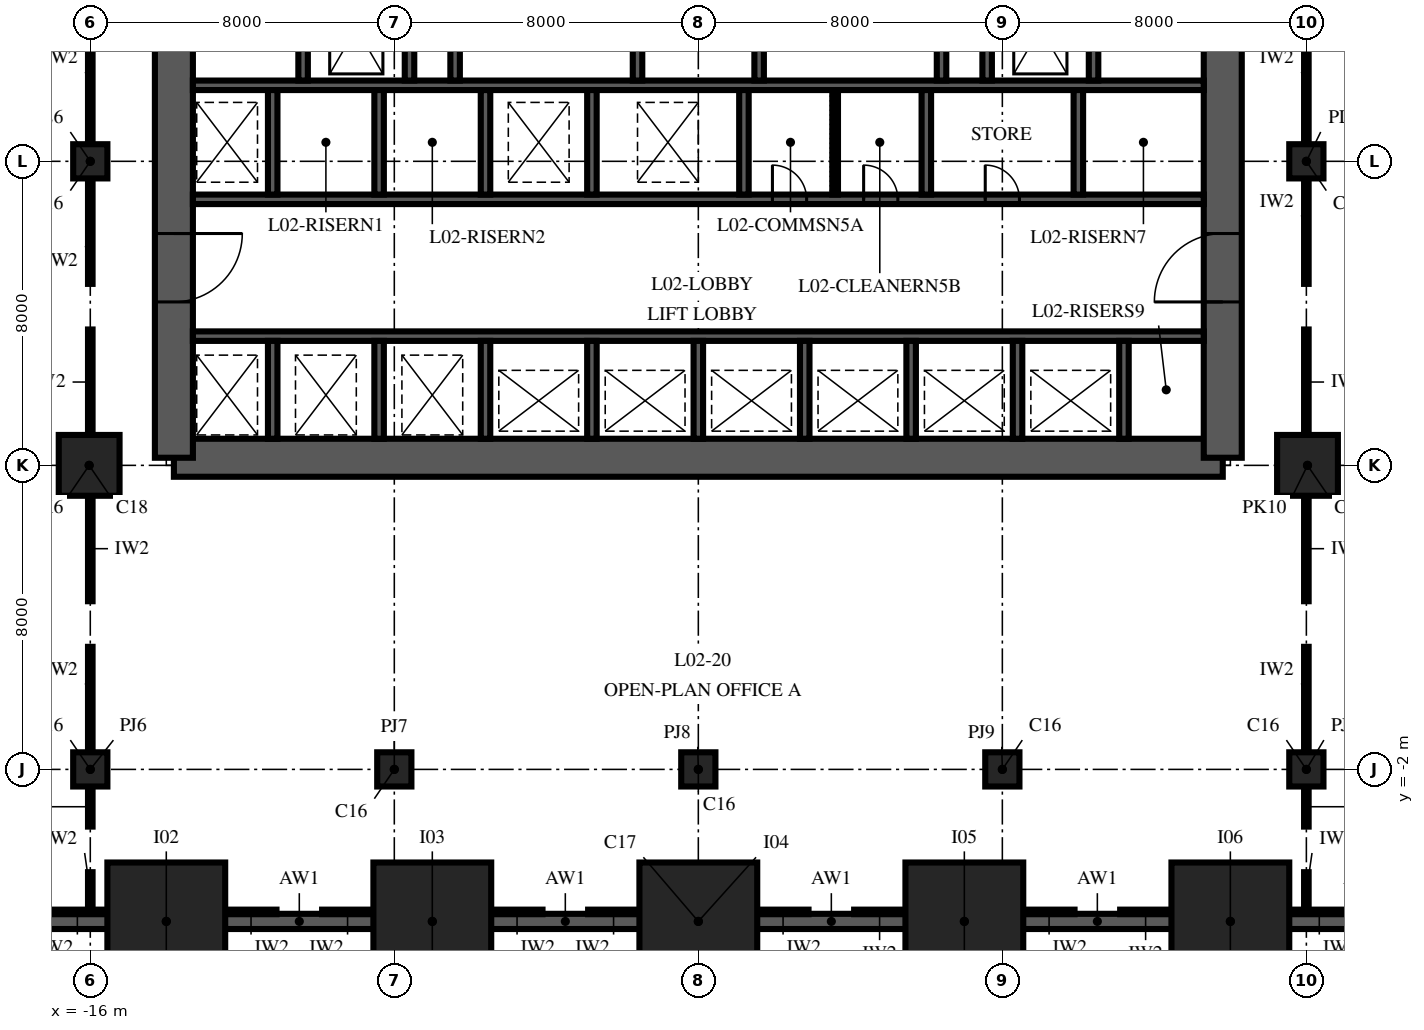
"""IFC4 building model, lengths in metres.
Left out: names, types, materials, properties, quantities, classifications, styles, units other than length and angle.
Written with IfcOpenShell. Run it as: python <this file> out.ifc"""

import sys

from ifc_helpers import new_model, si_unit, direction, frame, frame_2d, origin, origin_2d, place, context, subcontext, project, spatial, polyline, rectangle, outline, extrude, element, fill, save


model = new_model("IFC4")
c1 = context("Model", 3, precision=1e-05, world=origin(), true_north=direction((0.0, 1.0)))
c2 = subcontext(c1, "Body", "Model", "MODEL_VIEW")
j1 = project(units=[si_unit("LENGTHUNIT", "METRE"), si_unit("PLANEANGLEUNIT", "RADIAN")], contexts=[c1])
p1 = place(None, origin())
s1 = spatial("IfcSite", under=j1, at=p1, CompositionType="ELEMENT")
p2 = place(p1, origin())
s2 = spatial("IfcBuilding", under=s1, at=p2, CompositionType="ELEMENT")
p3 = place(p2, frame((0.0, 0.0, 12.0)))
s3 = spatial("IfcBuildingStorey", under=s2, at=p3, CompositionType="ELEMENT", Elevation=12.0)
for number, where, z_axis, x_axis in (
    (1, (-14.0, -6.0, 0.0), (0.0, 0.0, 1.0), (1.0, 0.0, 0.0)),
    (2, (-7.0, -6.0, 0.0), (0.0, 0.0, 1.0), (1.0, 0.0, 0.0)),
    (3, (0.0, -6.0, 0.0), (0.0, 0.0, 1.0), (1.0, 0.0, 0.0)),
    (4, (7.0, -6.0, 0.0), (0.0, 0.0, 1.0), (1.0, 0.0, 0.0)),
    (5, (14.0, -6.0, 0.0), (0.0, 0.0, 1.0), (1.0, 0.0, 0.0)),
):
    element("IfcColumn", number, at=place(p3, frame(where, z_axis=z_axis, x_axis=x_axis)), inside=s3, PredefinedType="COLUMN", context=c2, shape_type="SweptSolid", body=[
        extrude(rectangle(XDim=3.1, YDim=3.1, at=origin_2d()), origin(), (0.0, 0.0, 1.0), 7.0),
    ])
p4 = place(p3, frame((-16.0, -2.0, 0.0), z_axis=(0.0, 0.0, 1.0), x_axis=(1.0, 0.0, 0.0)))
e6 = element("IfcColumn", 6, at=p4, inside=s3, PredefinedType="COLUMN", context=c2, shape_type="SweptSolid", body=[
    extrude(rectangle(XDim=0.9, YDim=0.9, at=origin_2d()), origin(), (0.0, 0.0, 1.0), 7.0),
])
p5 = place(p3, frame((-16.03, 6.0, 0.0), z_axis=(0.0, 0.0, 1.0), x_axis=(1.0, 0.0, 0.0)))
e7 = element("IfcColumn", 7, at=p5, inside=s3, PredefinedType="COLUMN", context=c2, shape_type="SweptSolid", body=[
    extrude(rectangle(XDim=1.6, YDim=1.6, at=origin_2d()), origin(), (0.0, 0.0, 1.0), 7.0),
])
for number, where, z_axis, x_axis in (
    (8, (-16.0, 14.0, 0.0), (0.0, 0.0, 1.0), (1.0, 0.0, 0.0)),
    (9, (-8.0, -2.0, 0.0), (0.0, 0.0, 1.0), (1.0, 0.0, 0.0)),
    (10, (0.0, -2.0, 0.0), (0.0, 0.0, 1.0), (1.0, 0.0, 0.0)),
    (11, (8.0, -2.0, 0.0), (0.0, 0.0, 1.0), (1.0, 0.0, 0.0)),
    (12, (16.0, -2.0, 0.0), (0.0, 0.0, 1.0), (1.0, 0.0, 0.0)),
):
    element("IfcColumn", number, at=place(p3, frame(where, z_axis=z_axis, x_axis=x_axis)), inside=s3, PredefinedType="COLUMN", context=c2, shape_type="SweptSolid", body=[
        extrude(rectangle(XDim=0.9, YDim=0.9, at=origin_2d()), origin(), (0.0, 0.0, 1.0), 7.0),
    ])
p6 = place(p3, frame((16.03, 6.0, 0.0), z_axis=(0.0, 0.0, 1.0), x_axis=(1.0, 0.0, 0.0)))
e13 = element("IfcColumn", 13, at=p6, inside=s3, PredefinedType="COLUMN", context=c2, shape_type="SweptSolid", body=[
    extrude(rectangle(XDim=1.6, YDim=1.6, at=origin_2d()), origin(), (0.0, 0.0, 1.0), 7.0),
])
p7 = place(p3, frame((16.0, 14.0, 0.0), z_axis=(0.0, 0.0, 1.0), x_axis=(1.0, 0.0, 0.0)))
e14 = element("IfcColumn", 14, at=p7, inside=s3, PredefinedType="COLUMN", context=c2, shape_type="SweptSolid", body=[
    extrude(rectangle(XDim=0.9, YDim=0.9, at=origin_2d()), origin(), (0.0, 0.0, 1.0), 7.0),
])
p8 = place(p3, frame((-13.8, 6.2, 0.0), z_axis=(0.0, 0.0, 1.0), x_axis=(1.0, 0.0, 0.0)))
e15 = element("IfcWall", 15, at=p8, inside=s3, PredefinedType="SHEAR", context=c2, shape_type="SweptSolid", body=[
    extrude(rectangle(XDim=27.6, YDim=1.0, at=frame_2d((13.8, 0.0))), origin(), (0.0, 0.0, 1.0), 7.0),
])
p9 = place(p3, frame((13.8, 6.2, 0.0), z_axis=(0.0, 0.0, 1.0), x_axis=(0.0, 1.0, 0.0)))
e16 = element("IfcWall", 16, at=p9, inside=s3, PredefinedType="SHEAR", context=c2, shape_type="SweptSolid", body=[
    extrude(outline(polyline([(0.0, -0.5), (17.6, -0.5), (17.6, 0.0), (17.1, 0.0), (17.1, 0.5), (0.5, 0.5), (0.5, 0.0), (0.0, 0.0), (0.0, -0.5)])), origin(), (0.0, 0.0, 1.0), 7.0),
])
p10 = place(p9, frame((4.1, 0.0, 0.0)))
e17 = element("IfcOpeningElement", 17, at=p10, cuts=e16, PredefinedType="OPENING", context=c2, shape_type="SweptSolid", body=[
    extrude(rectangle(XDim=1.8, YDim=2.4, at=frame_2d((0.9, 1.2))), frame((0.0, 0.515, 0.0), z_axis=(0.0, -1.0, 0.0), x_axis=(1.0, 0.0, 0.0)), (0.0, 0.0, 1.0), 1.03),
])
p11 = place(p3, frame((-13.8, 23.8, 0.0), z_axis=(0.0, 0.0, 1.0), x_axis=(0.0, -1.0, 0.0)))
e18 = element("IfcWall", 18, at=p11, inside=s3, PredefinedType="SHEAR", context=c2, shape_type="SweptSolid", body=[
    extrude(outline(polyline([(0.0, -0.5), (17.6, -0.5), (17.6, 0.0), (17.1, 0.0), (17.1, 0.5), (0.5, 0.5), (0.5, 0.0), (0.0, 0.0), (0.0, -0.5)])), origin(), (0.0, 0.0, 1.0), 7.0),
])
p12 = place(p11, frame((11.7, 0.0, 0.0)))
e19 = element("IfcOpeningElement", 19, at=p12, cuts=e18, PredefinedType="OPENING", context=c2, shape_type="SweptSolid", body=[
    extrude(rectangle(XDim=1.8, YDim=2.4, at=frame_2d((0.9, 1.2))), frame((0.0, 0.515, 0.0), z_axis=(0.0, -1.0, 0.0), x_axis=(1.0, 0.0, 0.0)), (0.0, 0.0, 1.0), 1.03),
])
p13 = place(p3, frame((-13.3, 9.4, 0.0), z_axis=(0.0, 0.0, 1.0), x_axis=(1.0, 0.0, 0.0)))
e20 = element("IfcWall", 20, at=p13, inside=s3, PredefinedType="SHEAR", context=c2, shape_type="SweptSolid", body=[
    extrude(rectangle(XDim=26.6, YDim=0.25, at=frame_2d((13.3, 0.0))), origin(), (0.0, 0.0, 1.0), 7.0),
])
p14 = place(p3, frame((-13.3, 13.0, 0.0), z_axis=(0.0, 0.0, 1.0), x_axis=(1.0, 0.0, 0.0)))
e21 = element("IfcWall", 21, at=p14, inside=s3, PredefinedType="SHEAR", context=c2, shape_type="SweptSolid", body=[
    extrude(rectangle(XDim=26.6, YDim=0.25, at=frame_2d((13.3, 0.0))), origin(), (0.0, 0.0, 1.0), 7.0),
])
p15 = place(p14, frame((15.25, 0.0, 0.0)))
e22 = element("IfcOpeningElement", 22, at=p15, cuts=e21, PredefinedType="OPENING", context=c2, shape_type="SweptSolid", body=[
    extrude(rectangle(XDim=0.9, YDim=2.1, at=frame_2d((0.45, 1.05))), frame((0.0, 0.14, 0.0), z_axis=(0.0, -1.0, 0.0), x_axis=(1.0, 0.0, 0.0)), (0.0, 0.0, 1.0), 0.28),
])
p16 = place(p14, frame((17.65, 0.0, 0.0)))
e23 = element("IfcOpeningElement", 23, at=p16, cuts=e21, PredefinedType="OPENING", context=c2, shape_type="SweptSolid", body=[
    extrude(rectangle(XDim=0.9, YDim=2.1, at=frame_2d((0.45, 1.05))), frame((0.0, 0.14, 0.0), z_axis=(0.0, -1.0, 0.0), x_axis=(1.0, 0.0, 0.0)), (0.0, 0.0, 1.0), 0.28),
])
p17 = place(p14, frame((20.85, 0.0, 0.0)))
e24 = element("IfcOpeningElement", 24, at=p17, cuts=e21, PredefinedType="OPENING", context=c2, shape_type="SweptSolid", body=[
    extrude(rectangle(XDim=0.9, YDim=2.1, at=frame_2d((0.45, 1.05))), frame((0.0, 0.14, 0.0), z_axis=(0.0, -1.0, 0.0), x_axis=(1.0, 0.0, 0.0)), (0.0, 0.0, 1.0), 0.28),
])
p18 = place(p3, frame((-13.3, 16.0, 0.0), z_axis=(0.0, 0.0, 1.0), x_axis=(1.0, 0.0, 0.0)))
e25 = element("IfcWall", 25, at=p18, inside=s3, PredefinedType="SHEAR", context=c2, shape_type="SweptSolid", body=[
    extrude(rectangle(XDim=26.6, YDim=0.25, at=frame_2d((13.3, 0.0))), origin(), (0.0, 0.0, 1.0), 7.0),
])
for number, where, z_axis, x_axis in (
    (26, (-11.2, 6.7, 0.0), (0.0, 0.0, 1.0), (0.0, 1.0, 0.0)),
    (27, (-8.4, 6.7, 0.0), (0.0, 0.0, 1.0), (0.0, 1.0, 0.0)),
    (28, (-5.6, 6.7, 0.0), (0.0, 0.0, 1.0), (0.0, 1.0, 0.0)),
    (29, (-2.8, 6.7, 0.0), (0.0, 0.0, 1.0), (0.0, 1.0, 0.0)),
    (30, (0.0, 6.7, 0.0), (0.0, 0.0, 1.0), (0.0, 1.0, 0.0)),
    (31, (2.8, 6.7, 0.0), (0.0, 0.0, 1.0), (0.0, 1.0, 0.0)),
    (32, (5.6, 6.7, 0.0), (0.0, 0.0, 1.0), (0.0, 1.0, 0.0)),
    (33, (8.4, 6.7, 0.0), (0.0, 0.0, 1.0), (0.0, 1.0, 0.0)),
    (34, (11.2, 6.7, 0.0), (0.0, 0.0, 1.0), (0.0, 1.0, 0.0)),
):
    element("IfcWall", number, at=place(p3, frame(where, z_axis=z_axis, x_axis=x_axis)), inside=s3, PredefinedType="SHEAR", context=c2, shape_type="SweptSolid", body=[
        extrude(rectangle(XDim=2.575, YDim=0.25, at=frame_2d((1.288, 0.0))), origin(), (0.0, 0.0, 1.0), 7.0),
    ])
for number, where, z_axis, x_axis in (
    (35, (-11.2, 13.125, 0.0), (0.0, 0.0, 1.0), (0.0, 1.0, 0.0)),
    (36, (-8.4, 13.125, 0.0), (0.0, 0.0, 1.0), (0.0, 1.0, 0.0)),
    (37, (-5.6, 13.125, 0.0), (0.0, 0.0, 1.0), (0.0, 1.0, 0.0)),
    (38, (-2.8, 13.125, 0.0), (0.0, 0.0, 1.0), (0.0, 1.0, 0.0)),
    (39, (1.2, 13.125, 0.0), (0.0, 0.0, 1.0), (0.0, 1.0, 0.0)),
    (40, (6.0, 13.125, 0.0), (0.0, 0.0, 1.0), (0.0, 1.0, 0.0)),
    (41, (10.0, 13.125, 0.0), (0.0, 0.0, 1.0), (0.0, 1.0, 0.0)),
):
    element("IfcWall", number, at=place(p3, frame(where, z_axis=z_axis, x_axis=x_axis)), inside=s3, PredefinedType="SHEAR", context=c2, shape_type="SweptSolid", body=[
        extrude(rectangle(XDim=2.75, YDim=0.25, at=frame_2d((1.375, 0.0))), origin(), (0.0, 0.0, 1.0), 7.0),
    ])
p19 = place(p3, frame((-10.4, 16.125, 0.0), z_axis=(0.0, 0.0, 1.0), x_axis=(0.0, 1.0, 0.0)))
e42 = element("IfcWall", 42, at=p19, inside=s3, PredefinedType="SHEAR", context=c2, shape_type="SweptSolid", body=[
    extrude(rectangle(XDim=7.175, YDim=0.25, at=frame_2d((3.587, 0.0))), origin(), (0.0, 0.0, 1.0), 7.0),
])
p20 = place(p19, frame((5.975, 0.0, 0.0)))
e43 = element("IfcOpeningElement", 43, at=p20, cuts=e42, PredefinedType="OPENING", context=c2, shape_type="SweptSolid", body=[
    extrude(rectangle(XDim=1.0, YDim=2.1, at=frame_2d((0.5, 1.05))), frame((0.0, 0.14, 0.0), z_axis=(0.0, -1.0, 0.0), x_axis=(1.0, 0.0, 0.0)), (0.0, 0.0, 1.0), 0.28),
])
for number, where, z_axis, x_axis in (
    (44, (-6.4, 16.125, 0.0), (0.0, 0.0, 1.0), (0.0, 1.0, 0.0)),
    (45, (-1.6, 16.125, 0.0), (0.0, 0.0, 1.0), (0.0, 1.0, 0.0)),
    (46, (1.6, 16.125, 0.0), (0.0, 0.0, 1.0), (0.0, 1.0, 0.0)),
    (47, (6.4, 16.125, 0.0), (0.0, 0.0, 1.0), (0.0, 1.0, 0.0)),
):
    element("IfcWall", number, at=place(p3, frame(where, z_axis=z_axis, x_axis=x_axis)), inside=s3, PredefinedType="SHEAR", context=c2, shape_type="SweptSolid", body=[
        extrude(rectangle(XDim=7.175, YDim=0.25, at=frame_2d((3.587, 0.0))), origin(), (0.0, 0.0, 1.0), 7.0),
    ])
p21 = place(p3, frame((10.4, 16.125, 0.0), z_axis=(0.0, 0.0, 1.0), x_axis=(0.0, 1.0, 0.0)))
e48 = element("IfcWall", 48, at=p21, inside=s3, PredefinedType="SHEAR", context=c2, shape_type="SweptSolid", body=[
    extrude(rectangle(XDim=7.175, YDim=0.25, at=frame_2d((3.587, 0.0))), origin(), (0.0, 0.0, 1.0), 7.0),
])
p22 = place(p21, frame((5.975, 0.0, 0.0)))
e49 = element("IfcOpeningElement", 49, at=p22, cuts=e48, PredefinedType="OPENING", context=c2, shape_type="SweptSolid", body=[
    extrude(rectangle(XDim=1.0, YDim=2.1, at=frame_2d((0.5, 1.05))), frame((0.0, 0.14, 0.0), z_axis=(0.0, -1.0, 0.0), x_axis=(1.0, 0.0, 0.0)), (0.0, 0.0, 1.0), 0.28),
])
for number, where, z_axis, x_axis in (
    (50, (-7.6, 16.125, 0.0), (0.0, 0.0, 1.0), (0.0, 1.0, 0.0)),
    (51, (7.6, 16.125, 0.0), (0.0, 0.0, 1.0), (0.0, 1.0, 0.0)),
):
    element("IfcWall", number, at=place(p3, frame(where, z_axis=z_axis, x_axis=x_axis)), inside=s3, PredefinedType="SHEAR", context=c2, shape_type="SweptSolid", body=[
        extrude(rectangle(XDim=2.75, YDim=0.25, at=frame_2d((1.375, 0.0))), origin(), (0.0, 0.0, 1.0), 7.0),
    ])
for number, where, z_axis, x_axis in (
    (52, (-20.35, -6.0, 0.0), (0.0, 0.0, 1.0), (1.0, 0.0, 0.0)),
    (53, (-13.35, -6.0, 0.0), (0.0, 0.0, 1.0), (1.0, 0.0, 0.0)),
    (54, (-6.35, -6.0, 0.0), (0.0, 0.0, 1.0), (1.0, 0.0, 0.0)),
    (55, (0.65, -6.0, 0.0), (0.0, 0.0, 1.0), (1.0, 0.0, 0.0)),
    (56, (7.65, -6.0, 0.0), (0.0, 0.0, 1.0), (1.0, 0.0, 0.0)),
    (57, (14.65, -6.0, 0.0), (0.0, 0.0, 1.0), (1.0, 0.0, 0.0)),
):
    element("IfcWall", number, at=place(p3, frame(where, z_axis=z_axis, x_axis=x_axis)), inside=s3, PredefinedType="SHEAR", context=c2, shape_type="SweptSolid", body=[
        extrude(rectangle(XDim=5.7, YDim=0.4, at=frame_2d((2.85, 0.0))), origin(), (0.0, 0.0, 1.0), 7.0),
    ])
p23 = place(p3, frame((3.6, 13.125, 0.0), z_axis=(0.0, 0.0, 1.0), x_axis=(0.0, 1.0, 0.0)))
e58 = element("IfcWall", 58, at=p23, inside=s3, PredefinedType="PARTITIONING", context=c2, shape_type="SweptSolid", body=[
    extrude(rectangle(XDim=2.75, YDim=0.15, at=frame_2d((1.375, 0.0))), origin(), (0.0, 0.0, 1.0), 6.85),
])
for number, where, z_axis, x_axis in (
    (59, (-16.0, -5.75, 0.0), (0.0, 0.0, 1.0), (0.0, 1.0, 0.0)),
    (60, (-16.0, -3.505, 0.0), (0.0, 0.0, 1.0), (0.0, 1.0, 0.0)),
):
    element("IfcWall", number, at=place(p3, frame(where, z_axis=z_axis, x_axis=x_axis)), inside=s3, PredefinedType="PARTITIONING", context=c2, shape_type="SweptSolid", body=[
        extrude(rectangle(XDim=1.045, YDim=0.12, at=frame_2d((0.522, 0.0))), origin(), (0.0, 0.0, 1.0), 6.7),
    ])
p24 = place(p3, frame((-16.0, -1.54, 0.0), z_axis=(0.0, 0.0, 1.0), x_axis=(0.0, 1.0, 0.0)))
e61 = element("IfcWall", 61, at=p24, inside=s3, PredefinedType="PARTITIONING", context=c2, shape_type="SweptSolid", body=[
    extrude(rectangle(XDim=2.765, YDim=0.12, at=frame_2d((1.383, 0.0))), origin(), (0.0, 0.0, 1.0), 6.05),
])
for number, where, z_axis, x_axis in (
    (62, (-16.0, 2.425, 0.0), (0.0, 0.0, 1.0), (0.0, 1.0, 0.0)),
    (63, (-16.0, 6.81, 0.0), (0.0, 0.0, 1.0), (0.0, 1.0, 0.0)),
):
    element("IfcWall", number, at=place(p3, frame(where, z_axis=z_axis, x_axis=x_axis)), inside=s3, PredefinedType="PARTITIONING", context=c2, shape_type="SweptSolid", body=[
        extrude(rectangle(XDim=2.765, YDim=0.12, at=frame_2d((1.382, 0.0))), origin(), (0.0, 0.0, 1.0), 6.05),
    ])
p25 = place(p3, frame((-16.0, 10.775, 0.0), z_axis=(0.0, 0.0, 1.0), x_axis=(0.0, 1.0, 0.0)))
e64 = element("IfcWall", 64, at=p25, inside=s3, PredefinedType="PARTITIONING", context=c2, shape_type="SweptSolid", body=[
    extrude(rectangle(XDim=2.765, YDim=0.12, at=frame_2d((1.383, 0.0))), origin(), (0.0, 0.0, 1.0), 6.05),
])
p26 = place(p3, frame((-16.0, 14.46, 0.0), z_axis=(0.0, 0.0, 1.0), x_axis=(0.0, 1.0, 0.0)))
e65 = element("IfcWall", 65, at=p26, inside=s3, PredefinedType="PARTITIONING", context=c2, shape_type="SweptSolid", body=[
    extrude(rectangle(XDim=2.94, YDim=0.12, at=frame_2d((1.47, 0.0))), origin(), (0.0, 0.0, 1.0), 6.05),
])
for number, where, z_axis, x_axis in (
    (66, (16.0, -5.75, 0.0), (0.0, 0.0, 1.0), (0.0, 1.0, 0.0)),
    (67, (16.0, -3.505, 0.0), (0.0, 0.0, 1.0), (0.0, 1.0, 0.0)),
):
    element("IfcWall", number, at=place(p3, frame(where, z_axis=z_axis, x_axis=x_axis)), inside=s3, PredefinedType="PARTITIONING", context=c2, shape_type="SweptSolid", body=[
        extrude(rectangle(XDim=1.045, YDim=0.12, at=frame_2d((0.522, 0.0))), origin(), (0.0, 0.0, 1.0), 6.7),
    ])
p27 = place(p3, frame((16.0, -1.54, 0.0), z_axis=(0.0, 0.0, 1.0), x_axis=(0.0, 1.0, 0.0)))
e68 = element("IfcWall", 68, at=p27, inside=s3, PredefinedType="PARTITIONING", context=c2, shape_type="SweptSolid", body=[
    extrude(rectangle(XDim=2.765, YDim=0.12, at=frame_2d((1.383, 0.0))), origin(), (0.0, 0.0, 1.0), 6.05),
])
for number, where, z_axis, x_axis in (
    (69, (16.0, 2.425, 0.0), (0.0, 0.0, 1.0), (0.0, 1.0, 0.0)),
    (70, (16.0, 6.81, 0.0), (0.0, 0.0, 1.0), (0.0, 1.0, 0.0)),
):
    element("IfcWall", number, at=place(p3, frame(where, z_axis=z_axis, x_axis=x_axis)), inside=s3, PredefinedType="PARTITIONING", context=c2, shape_type="SweptSolid", body=[
        extrude(rectangle(XDim=2.765, YDim=0.12, at=frame_2d((1.382, 0.0))), origin(), (0.0, 0.0, 1.0), 6.05),
    ])
p28 = place(p3, frame((16.0, 10.775, 0.0), z_axis=(0.0, 0.0, 1.0), x_axis=(0.0, 1.0, 0.0)))
e71 = element("IfcWall", 71, at=p28, inside=s3, PredefinedType="PARTITIONING", context=c2, shape_type="SweptSolid", body=[
    extrude(rectangle(XDim=2.765, YDim=0.12, at=frame_2d((1.383, 0.0))), origin(), (0.0, 0.0, 1.0), 6.05),
])
p29 = place(p3, frame((16.0, 14.46, 0.0), z_axis=(0.0, 0.0, 1.0), x_axis=(0.0, 1.0, 0.0)))
e72 = element("IfcWall", 72, at=p29, inside=s3, PredefinedType="PARTITIONING", context=c2, shape_type="SweptSolid", body=[
    extrude(rectangle(XDim=2.94, YDim=0.12, at=frame_2d((1.47, 0.0))), origin(), (0.0, 0.0, 1.0), 6.05),
])
p30 = place(p3, frame((-17.12, -5.75, 0.0), z_axis=(0.0, 0.0, 1.0), x_axis=(1.0, 0.0, 0.0)))
e73 = element("IfcWall", 73, at=p30, inside=s3, PredefinedType="PARTITIONING", context=c2, shape_type="SweptSolid", body=[
    extrude(rectangle(XDim=1.56, YDim=0.12, at=frame_2d((0.78, 0.0))), origin(), (0.0, 0.0, 1.0), 6.7),
])
for number, where, z_axis, x_axis in (
    (74, (-12.44, -5.75, 0.0), (0.0, 0.0, 1.0), (1.0, 0.0, 0.0)),
    (75, (-9.9, -5.75, 0.0), (0.0, 0.0, 1.0), (1.0, 0.0, 0.0)),
    (76, (-5.44, -5.75, 0.0), (0.0, 0.0, 1.0), (1.0, 0.0, 0.0)),
    (77, (-2.9, -5.75, 0.0), (0.0, 0.0, 1.0), (1.0, 0.0, 0.0)),
    (78, (1.56, -5.75, 0.0), (0.0, 0.0, 1.0), (1.0, 0.0, 0.0)),
    (79, (4.1, -5.75, 0.0), (0.0, 0.0, 1.0), (1.0, 0.0, 0.0)),
    (80, (8.56, -5.75, 0.0), (0.0, 0.0, 1.0), (1.0, 0.0, 0.0)),
    (81, (11.1, -5.75, 0.0), (0.0, 0.0, 1.0), (1.0, 0.0, 0.0)),
):
    element("IfcWall", number, at=place(p3, frame(where, z_axis=z_axis, x_axis=x_axis)), inside=s3, PredefinedType="PARTITIONING", context=c2, shape_type="SweptSolid", body=[
        extrude(rectangle(XDim=1.34, YDim=0.12, at=frame_2d((0.67, 0.0))), origin(), (0.0, 0.0, 1.0), 6.7),
    ])
p31 = place(p3, frame((15.56, -5.75, 0.0), z_axis=(0.0, 0.0, 1.0), x_axis=(1.0, 0.0, 0.0)))
e82 = element("IfcWall", 82, at=p31, inside=s3, PredefinedType="PARTITIONING", context=c2, shape_type="SweptSolid", body=[
    extrude(rectangle(XDim=1.56, YDim=0.12, at=frame_2d((0.78, 0.0))), origin(), (0.0, 0.0, 1.0), 6.7),
])
p32 = place(p10, origin())
e83 = element("IfcDoor", 83, at=p32, inside=s3, OperationType="DOUBLE_DOOR_SINGLE_SWING", PredefinedType="DOOR", context=c2, shape_type="SweptSolid", body=[
    extrude(rectangle(XDim=1.8, YDim=2.4, at=frame_2d((0.9, 1.2))), frame((0.0, 0.5, 0.0), z_axis=(0.0, -1.0, 0.0), x_axis=(1.0, 0.0, 0.0)), (0.0, 0.0, 1.0), 1.0),
])
fill(e17, e83)
p33 = place(p12, origin())
e84 = element("IfcDoor", 84, at=p33, inside=s3, OperationType="DOUBLE_DOOR_SINGLE_SWING", PredefinedType="DOOR", context=c2, shape_type="SweptSolid", body=[
    extrude(rectangle(XDim=1.8, YDim=2.4, at=frame_2d((0.9, 1.2))), frame((0.0, 0.5, 0.0), z_axis=(0.0, -1.0, 0.0), x_axis=(1.0, 0.0, 0.0)), (0.0, 0.0, 1.0), 1.0),
])
fill(e19, e84)
p34 = place(p15, origin())
e85 = element("IfcDoor", 85, at=p34, inside=s3, OperationType="SINGLE_SWING_LEFT", PredefinedType="DOOR", context=c2, shape_type="SweptSolid", body=[
    extrude(rectangle(XDim=0.9, YDim=2.1, at=frame_2d((0.45, 1.05))), frame((0.0, 0.125, 0.0), z_axis=(0.0, -1.0, 0.0), x_axis=(1.0, 0.0, 0.0)), (0.0, 0.0, 1.0), 0.25),
])
fill(e22, e85)
p35 = place(p16, origin())
e86 = element("IfcDoor", 86, at=p35, inside=s3, OperationType="SINGLE_SWING_LEFT", PredefinedType="DOOR", context=c2, shape_type="SweptSolid", body=[
    extrude(rectangle(XDim=0.9, YDim=2.1, at=frame_2d((0.45, 1.05))), frame((0.0, 0.125, 0.0), z_axis=(0.0, -1.0, 0.0), x_axis=(1.0, 0.0, 0.0)), (0.0, 0.0, 1.0), 0.25),
])
fill(e23, e86)
p36 = place(p17, origin())
e87 = element("IfcDoor", 87, at=p36, inside=s3, OperationType="SINGLE_SWING_LEFT", PredefinedType="DOOR", context=c2, shape_type="SweptSolid", body=[
    extrude(rectangle(XDim=0.9, YDim=2.1, at=frame_2d((0.45, 1.05))), frame((0.0, 0.125, 0.0), z_axis=(0.0, -1.0, 0.0), x_axis=(1.0, 0.0, 0.0)), (0.0, 0.0, 1.0), 0.25),
])
fill(e24, e87)
save(model, sys.argv[1])
